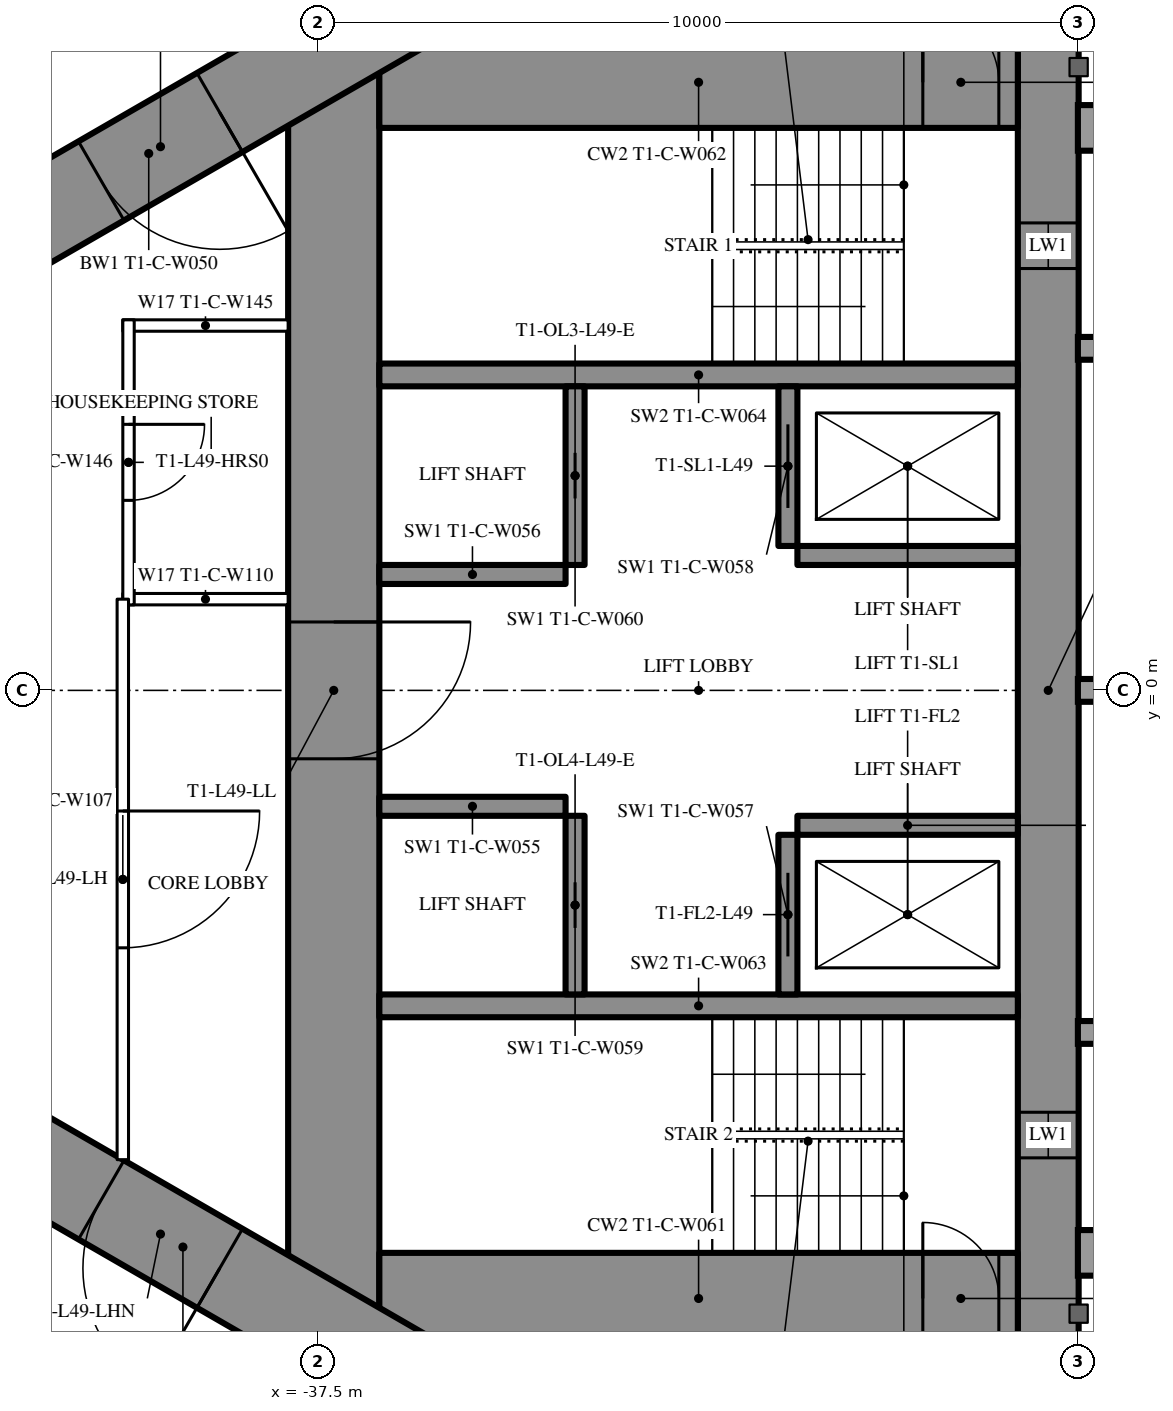
"""IFC4 building model, lengths in metres.
Left out: names, types, materials, properties, quantities, classifications, styles, units other than length and angle.
Written with IfcOpenShell. Run it as: python <this file> out.ifc"""

import sys

from ifc_helpers import new_model, si_unit, direction, frame, frame_2d, origin, place, context, subcontext, project, spatial, rectangle, extrude, element, fill, save


model = new_model("IFC4")
c1 = context("Model", 3, precision=1e-05, world=origin(), true_north=direction((0.0, 1.0)))
c2 = subcontext(c1, "Body", "Model", "MODEL_VIEW")
j1 = project(units=[si_unit("LENGTHUNIT", "METRE"), si_unit("PLANEANGLEUNIT", "RADIAN")], contexts=[c1])
p1 = place(None, origin())
s1 = spatial("IfcSite", under=j1, at=p1, CompositionType="ELEMENT")
p2 = place(p1, origin())
s2 = spatial("IfcBuilding", under=s1, at=p2, CompositionType="ELEMENT")
p3 = place(p2, frame((0.0, 0.0, 184.3)))
s3 = spatial("IfcBuildingStorey", under=s2, at=p3, CompositionType="ELEMENT", Elevation=184.3)
p4 = place(p3, frame((-27.9, 8.6, 0.0), z_axis=(0.0, 0.0, 1.0), x_axis=(0.0, -1.0, 0.0)))
e1 = element("IfcWall", 1, at=p4, inside=s3, PredefinedType="SHEAR", context=c2, shape_type="SweptSolid", body=[
    extrude(rectangle(XDim=17.2, YDim=0.8, at=frame_2d((8.6, 0.0))), origin(), (0.0, 0.0, 1.0), 3.5),
])
p5 = place(p4, frame((2.45, 0.0, 0.6)))
e2 = element("IfcOpeningElement", 2, at=p5, cuts=e1, PredefinedType="OPENING", context=c2, shape_type="SweptSolid", body=[
    extrude(rectangle(XDim=0.6, YDim=2.1, at=frame_2d((0.3, 1.05))), frame((0.0, 0.41, 0.0), z_axis=(0.0, -1.0, 0.0), x_axis=(1.0, 0.0, 0.0)), (0.0, 0.0, 1.0), 0.82),
])
p6 = place(p4, frame((14.15, 0.0, 0.6)))
e3 = element("IfcOpeningElement", 3, at=p6, cuts=e1, PredefinedType="OPENING", context=c2, shape_type="SweptSolid", body=[
    extrude(rectangle(XDim=0.6, YDim=2.1, at=frame_2d((0.3, 1.05))), frame((0.0, 0.41, 0.0), z_axis=(0.0, -1.0, 0.0), x_axis=(1.0, 0.0, 0.0)), (0.0, 0.0, 1.0), 0.82),
])
p7 = place(p3, frame((-37.3, 8.6, 0.0), z_axis=(0.0, 0.0, 1.0), x_axis=(0.0, -1.0, 0.0)))
e4 = element("IfcWall", 4, at=p7, inside=s3, PredefinedType="SHEAR", context=c2, shape_type="SweptSolid", body=[
    extrude(rectangle(XDim=17.2, YDim=1.2, at=frame_2d((8.6, 0.0))), origin(), (0.0, 0.0, 1.0), 3.5),
])
p8 = place(p7, frame((7.7, 0.0, 0.0)))
e5 = element("IfcOpeningElement", 5, at=p8, cuts=e4, PredefinedType="OPENING", context=c2, shape_type="SweptSolid", body=[
    extrude(rectangle(XDim=1.8, YDim=2.2, at=frame_2d((0.9, 1.1))), frame((0.0, 0.61, 0.0), z_axis=(0.0, -1.0, 0.0), x_axis=(1.0, 0.0, 0.0)), (0.0, 0.0, 1.0), 1.22),
])
p9 = place(p3, frame((-28.3, 8.0, 0.0), z_axis=(0.0, 0.0, 1.0), x_axis=(-1.0, 0.0, 0.0)))
e6 = element("IfcWall", 6, at=p9, inside=s3, PredefinedType="SHEAR", context=c2, shape_type="SweptSolid", body=[
    extrude(rectangle(XDim=8.4, YDim=1.2, at=frame_2d((4.2, 0.0))), origin(), (0.0, 0.0, 1.0), 3.5),
])
p10 = place(p9, frame((0.25, 0.0, 0.0)))
e7 = element("IfcOpeningElement", 7, at=p10, cuts=e6, PredefinedType="OPENING", context=c2, shape_type="SweptSolid", body=[
    extrude(rectangle(XDim=1.0, YDim=2.2, at=frame_2d((0.5, 1.1))), frame((0.0, 0.61, 0.0), z_axis=(0.0, -1.0, 0.0), x_axis=(1.0, 0.0, 0.0)), (0.0, 0.0, 1.0), 1.22),
])
p11 = place(p3, frame((-28.3, -8.0, 0.0), z_axis=(0.0, 0.0, 1.0), x_axis=(-1.0, 0.0, 0.0)))
e8 = element("IfcWall", 8, at=p11, inside=s3, PredefinedType="SHEAR", context=c2, shape_type="SweptSolid", body=[
    extrude(rectangle(XDim=8.4, YDim=1.2, at=frame_2d((4.2, 0.0))), origin(), (0.0, 0.0, 1.0), 3.5),
])
p12 = place(p11, frame((0.25, 0.0, 0.0)))
e9 = element("IfcOpeningElement", 9, at=p12, cuts=e8, PredefinedType="OPENING", context=c2, shape_type="SweptSolid", body=[
    extrude(rectangle(XDim=1.0, YDim=2.2, at=frame_2d((0.5, 1.1))), frame((0.0, 0.61, 0.0), z_axis=(0.0, -1.0, 0.0), x_axis=(1.0, 0.0, 0.0)), (0.0, 0.0, 1.0), 1.22),
])
for number, where, z_axis, x_axis in (
    (10, (-28.3, 4.15, 0.0), (0.0, 0.0, 1.0), (-1.0, 0.0, 0.0)),
    (11, (-28.3, -4.15, 0.0), (0.0, 0.0, 1.0), (-1.0, 0.0, 0.0)),
):
    element("IfcWall", number, at=place(p3, frame(where, z_axis=z_axis, x_axis=x_axis)), inside=s3, PredefinedType="SHEAR", context=c2, shape_type="SweptSolid", body=[
        extrude(rectangle(XDim=8.4, YDim=0.3, at=frame_2d((4.2, 0.0))), origin(), (0.0, 0.0, 1.0), 3.5),
    ])
p13 = place(p3, frame((-31.325, 4.0, 0.0), z_axis=(0.0, 0.0, 1.0), x_axis=(0.0, -1.0, 0.0)))
e12 = element("IfcWall", 12, at=p13, inside=s3, PredefinedType="SHEAR", context=c2, shape_type="SweptSolid", body=[
    extrude(rectangle(XDim=2.1, YDim=0.25, at=frame_2d((1.05, 0.0))), origin(), (0.0, 0.0, 1.0), 3.5),
])
p14 = place(p13, frame((0.5, 0.0, 0.0)))
e13 = element("IfcOpeningElement", 13, at=p14, cuts=e12, PredefinedType="OPENING", context=c2, shape_type="SweptSolid", body=[
    extrude(rectangle(XDim=1.1, YDim=2.2, at=frame_2d((0.55, 1.1))), frame((0.0, 0.135, 0.0), z_axis=(0.0, -1.0, 0.0), x_axis=(1.0, 0.0, 0.0)), (0.0, 0.0, 1.0), 0.27),
])
p15 = place(p3, frame((-34.125, 4.0, 0.0), z_axis=(0.0, 0.0, 1.0), x_axis=(0.0, -1.0, 0.0)))
e14 = element("IfcWall", 14, at=p15, inside=s3, PredefinedType="SHEAR", context=c2, shape_type="SweptSolid", body=[
    extrude(rectangle(XDim=2.35, YDim=0.25, at=frame_2d((1.175, 0.0))), origin(), (0.0, 0.0, 1.0), 3.5),
])
p16 = place(p15, frame((0.875, 0.0, 0.0)))
e15 = element("IfcOpeningElement", 15, at=p16, cuts=e14, PredefinedType="OPENING", context=c2, shape_type="SweptSolid", body=[
    extrude(rectangle(XDim=0.6, YDim=2.0, at=frame_2d((0.3, 1.0))), frame((0.0, 0.135, 0.0), z_axis=(0.0, -1.0, 0.0), x_axis=(1.0, 0.0, 0.0)), (0.0, 0.0, 1.0), 0.27),
])
p17 = place(p3, frame((-28.3, 1.775, 0.0), z_axis=(0.0, 0.0, 1.0), x_axis=(-1.0, 0.0, 0.0)))
e16 = element("IfcWall", 16, at=p17, inside=s3, PredefinedType="SHEAR", context=c2, shape_type="SweptSolid", body=[
    extrude(rectangle(XDim=2.9, YDim=0.25, at=frame_2d((1.45, 0.0))), origin(), (0.0, 0.0, 1.0), 3.5),
])
p18 = place(p3, frame((-34.25, 1.525, 0.0), z_axis=(0.0, 0.0, 1.0), x_axis=(-1.0, 0.0, 0.0)))
e17 = element("IfcWall", 17, at=p18, inside=s3, PredefinedType="SHEAR", context=c2, shape_type="SweptSolid", body=[
    extrude(rectangle(XDim=2.45, YDim=0.25, at=frame_2d((1.225, 0.0))), origin(), (0.0, 0.0, 1.0), 3.5),
])
p19 = place(p3, frame((-31.325, -1.9, 0.0), z_axis=(0.0, 0.0, 1.0), x_axis=(0.0, -1.0, 0.0)))
e18 = element("IfcWall", 18, at=p19, inside=s3, PredefinedType="SHEAR", context=c2, shape_type="SweptSolid", body=[
    extrude(rectangle(XDim=2.1, YDim=0.25, at=frame_2d((1.05, 0.0))), origin(), (0.0, 0.0, 1.0), 3.5),
])
p20 = place(p19, frame((0.5, 0.0, 0.0)))
e19 = element("IfcOpeningElement", 19, at=p20, cuts=e18, PredefinedType="OPENING", context=c2, shape_type="SweptSolid", body=[
    extrude(rectangle(XDim=1.1, YDim=2.2, at=frame_2d((0.55, 1.1))), frame((0.0, 0.135, 0.0), z_axis=(0.0, -1.0, 0.0), x_axis=(1.0, 0.0, 0.0)), (0.0, 0.0, 1.0), 0.27),
])
p21 = place(p3, frame((-34.125, -1.65, 0.0), z_axis=(0.0, 0.0, 1.0), x_axis=(0.0, -1.0, 0.0)))
e20 = element("IfcWall", 20, at=p21, inside=s3, PredefinedType="SHEAR", context=c2, shape_type="SweptSolid", body=[
    extrude(rectangle(XDim=2.35, YDim=0.25, at=frame_2d((1.175, 0.0))), origin(), (0.0, 0.0, 1.0), 3.5),
])
p22 = place(p21, frame((0.875, 0.0, 0.0)))
e21 = element("IfcOpeningElement", 21, at=p22, cuts=e20, PredefinedType="OPENING", context=c2, shape_type="SweptSolid", body=[
    extrude(rectangle(XDim=0.6, YDim=2.0, at=frame_2d((0.3, 1.0))), frame((0.0, 0.135, 0.0), z_axis=(0.0, -1.0, 0.0), x_axis=(1.0, 0.0, 0.0)), (0.0, 0.0, 1.0), 0.27),
])
p23 = place(p3, frame((-28.3, -1.775, 0.0), z_axis=(0.0, 0.0, 1.0), x_axis=(-1.0, 0.0, 0.0)))
e22 = element("IfcWall", 22, at=p23, inside=s3, PredefinedType="SHEAR", context=c2, shape_type="SweptSolid", body=[
    extrude(rectangle(XDim=2.9, YDim=0.25, at=frame_2d((1.45, 0.0))), origin(), (0.0, 0.0, 1.0), 3.5),
])
p24 = place(p3, frame((-34.25, -1.525, 0.0), z_axis=(0.0, 0.0, 1.0), x_axis=(-1.0, 0.0, 0.0)))
e23 = element("IfcWall", 23, at=p24, inside=s3, PredefinedType="SHEAR", context=c2, shape_type="SweptSolid", body=[
    extrude(rectangle(XDim=2.45, YDim=0.25, at=frame_2d((1.225, 0.0))), origin(), (0.0, 0.0, 1.0), 3.5),
])
p25 = place(p3, frame((-27.2, 14.3, 0.0), z_axis=(0.0, 0.0, 1.0), x_axis=(-0.866026593062, -0.499997940104, 0.0)))
e24 = element("IfcWall", 24, at=p25, inside=s3, PredefinedType="SHEAR", context=c2, shape_type="SweptSolid", body=[
    extrude(rectangle(XDim=28.946, YDim=1.2, at=frame_2d((14.473, 0.0))), origin(), (0.0, 0.0, 1.0), 3.5),
])
p26 = place(p25, frame((4.6, 0.0, 0.0)))
e25 = element("IfcOpeningElement", 25, at=p26, cuts=e24, PredefinedType="OPENING", context=c2, shape_type="SweptSolid", body=[
    extrude(rectangle(XDim=1.0, YDim=2.2, at=frame_2d((0.5, 1.1))), frame((0.0, 0.61, 0.0), z_axis=(0.0, -1.0, 0.0), x_axis=(1.0, 0.0, 0.0)), (0.0, 0.0, 1.0), 1.22),
])
p27 = place(p25, frame((13.395, 0.0, 0.0)))
e26 = element("IfcOpeningElement", 26, at=p27, cuts=e24, PredefinedType="OPENING", context=c2, shape_type="SweptSolid", body=[
    extrude(rectangle(XDim=1.8, YDim=2.2, at=frame_2d((0.9, 1.1))), frame((0.0, 0.61, 0.0), z_axis=(0.0, -1.0, 0.0), x_axis=(1.0, 0.0, 0.0)), (0.0, 0.0, 1.0), 1.22),
])
p28 = place(p3, frame((-27.2, -14.3, 0.0), z_axis=(0.0, 0.0, 1.0), x_axis=(-0.866024021859, 0.500002393557, 0.0)))
e27 = element("IfcWall", 27, at=p28, inside=s3, PredefinedType="SHEAR", context=c2, shape_type="SweptSolid", body=[
    extrude(rectangle(XDim=27.907, YDim=1.2, at=frame_2d((13.954, 0.0))), origin(), (0.0, 0.0, 1.0), 3.5),
])
p29 = place(p28, frame((4.6, 0.0, 0.0)))
e28 = element("IfcOpeningElement", 28, at=p29, cuts=e27, PredefinedType="OPENING", context=c2, shape_type="SweptSolid", body=[
    extrude(rectangle(XDim=1.0, YDim=2.2, at=frame_2d((0.5, 1.1))), frame((0.0, 0.61, 0.0), z_axis=(0.0, -1.0, 0.0), x_axis=(1.0, 0.0, 0.0)), (0.0, 0.0, 1.0), 1.22),
])
p30 = place(p28, frame((13.395, 0.0, 0.0)))
e29 = element("IfcOpeningElement", 29, at=p30, cuts=e27, PredefinedType="OPENING", context=c2, shape_type="SweptSolid", body=[
    extrude(rectangle(XDim=1.8, YDim=2.2, at=frame_2d((0.9, 1.1))), frame((0.0, 0.61, 0.0), z_axis=(0.0, -1.0, 0.0), x_axis=(1.0, 0.0, 0.0)), (0.0, 0.0, 1.0), 1.22),
])
for number, where, z_axis, x_axis in (
    (30, (-37.9, 1.2, 0.0), (0.0, 0.0, 1.0), (-1.0, 0.0, 0.0)),
    (31, (-37.9, 4.8, 0.0), (0.0, 0.0, 1.0), (-1.0, 0.0, 0.0)),
):
    element("IfcWall", number, at=place(p3, frame(where, z_axis=z_axis, x_axis=x_axis)), inside=s3, PredefinedType="PARTITIONING", context=c2, shape_type="SweptSolid", body=[
        extrude(rectangle(XDim=2.175, YDim=0.15, at=frame_2d((1.087, 0.0))), origin(), (0.0, 0.0, 1.0), 3.25),
    ])
p31 = place(p3, frame((-40.0, 4.875, 0.0), z_axis=(0.0, 0.0, 1.0), x_axis=(0.0, -1.0, 0.0)))
e32 = element("IfcWall", 32, at=p31, inside=s3, PredefinedType="PARTITIONING", context=c2, shape_type="SweptSolid", body=[
    extrude(rectangle(XDim=3.75, YDim=0.15, at=frame_2d((1.875, 0.0))), origin(), (0.0, 0.0, 1.0), 3.25),
])
p32 = place(p31, frame((1.375, 0.0, 0.0)))
e33 = element("IfcOpeningElement", 33, at=p32, cuts=e32, PredefinedType="OPENING", context=c2, shape_type="SweptSolid", body=[
    extrude(rectangle(XDim=1.0, YDim=2.2, at=frame_2d((0.5, 1.1))), frame((0.0, 0.085, 0.0), z_axis=(0.0, -1.0, 0.0), x_axis=(1.0, 0.0, 0.0)), (0.0, 0.0, 1.0), 0.17),
])
p33 = place(p3, frame((-40.075, 1.2, 0.0), z_axis=(0.0, 0.0, 1.0), x_axis=(0.0, -1.0, 0.0)))
e34 = element("IfcWall", 34, at=p33, inside=s3, PredefinedType="PARTITIONING", context=c2, shape_type="SweptSolid", body=[
    extrude(rectangle(XDim=7.374, YDim=0.15, at=frame_2d((3.687, 0.0))), origin(), (0.0, 0.0, 1.0), 3.25),
])
p34 = place(p33, frame((2.787, 0.0, 0.0)))
e35 = element("IfcOpeningElement", 35, at=p34, cuts=e34, PredefinedType="OPENING", context=c2, shape_type="SweptSolid", body=[
    extrude(rectangle(XDim=1.8, YDim=2.2, at=frame_2d((0.9, 1.1))), frame((0.0, 0.085, 0.0), z_axis=(0.0, -1.0, 0.0), x_axis=(1.0, 0.0, 0.0)), (0.0, 0.0, 1.0), 0.17),
])
p35 = place(p3, frame((-39.758, -11.697, 0.0), z_axis=(0.0, 0.0, 1.0), x_axis=(-0.866024194504, 0.500002094529, 0.0)))
e36 = element("IfcWall", 36, at=p35, inside=s3, PredefinedType="PARTITIONING", context=c2, shape_type="SweptSolid", body=[
    extrude(rectangle(XDim=6.6, YDim=0.25, at=frame_2d((3.3, 0.0))), origin(), (0.0, 0.0, 1.0), 3.25),
])
p36 = place(p35, frame((0.75, 0.0, 0.0)))
e37 = element("IfcOpeningElement", 37, at=p36, cuts=e36, PredefinedType="OPENING", context=c2, shape_type="SweptSolid", body=[
    extrude(rectangle(XDim=1.1, YDim=2.2, at=frame_2d((0.55, 1.1))), frame((0.0, 0.135, 0.0), z_axis=(0.0, -1.0, 0.0), x_axis=(1.0, 0.0, 0.0)), (0.0, 0.0, 1.0), 0.27),
])
p37 = place(p35, frame((2.75, 0.0, 0.0)))
e38 = element("IfcOpeningElement", 38, at=p37, cuts=e36, PredefinedType="OPENING", context=c2, shape_type="SweptSolid", body=[
    extrude(rectangle(XDim=1.1, YDim=2.2, at=frame_2d((0.55, 1.1))), frame((0.0, 0.135, 0.0), z_axis=(0.0, -1.0, 0.0), x_axis=(1.0, 0.0, 0.0)), (0.0, 0.0, 1.0), 0.27),
])
p38 = place(p35, frame((4.75, 0.0, 0.0)))
e39 = element("IfcOpeningElement", 39, at=p38, cuts=e36, PredefinedType="OPENING", context=c2, shape_type="SweptSolid", body=[
    extrude(rectangle(XDim=1.1, YDim=2.2, at=frame_2d((0.55, 1.1))), frame((0.0, 0.135, 0.0), z_axis=(0.0, -1.0, 0.0), x_axis=(1.0, 0.0, 0.0)), (0.0, 0.0, 1.0), 0.27),
])
p39 = place(p32, origin())
e40 = element("IfcDoor", 40, at=p39, inside=s3, OperationType="SINGLE_SWING_LEFT", PredefinedType="DOOR", context=c2, shape_type="SweptSolid", body=[
    extrude(rectangle(XDim=1.0, YDim=2.2, at=frame_2d((0.5, 1.1))), frame((0.0, 0.025, 0.0), z_axis=(0.0, -1.0, 0.0), x_axis=(1.0, 0.0, 0.0)), (0.0, 0.0, 1.0), 0.05),
])
fill(e33, e40)
p40 = place(p34, origin())
e41 = element("IfcDoor", 41, at=p40, inside=s3, OperationType="DOUBLE_DOOR_SINGLE_SWING", PredefinedType="DOOR", context=c2, shape_type="SweptSolid", body=[
    extrude(rectangle(XDim=1.8, YDim=2.2, at=frame_2d((0.9, 1.1))), frame((0.0, 0.025, 0.0), z_axis=(0.0, -1.0, 0.0), x_axis=(1.0, 0.0, 0.0)), (0.0, 0.0, 1.0), 0.05),
])
fill(e35, e41)
p41 = place(p27, origin())
e42 = element("IfcDoor", 42, at=p41, inside=s3, OperationType="DOUBLE_DOOR_SINGLE_SWING", PredefinedType="DOOR", context=c2, shape_type="SweptSolid", body=[
    extrude(rectangle(XDim=1.8, YDim=2.2, at=frame_2d((0.9, 1.1))), frame((0.0, 0.025, 0.0), z_axis=(0.0, -1.0, 0.0), x_axis=(1.0, 0.0, 0.0)), (0.0, 0.0, 1.0), 0.05),
])
fill(e26, e42)
p42 = place(p30, origin())
e43 = element("IfcDoor", 43, at=p42, inside=s3, OperationType="DOUBLE_DOOR_SINGLE_SWING", PredefinedType="DOOR", context=c2, shape_type="SweptSolid", body=[
    extrude(rectangle(XDim=1.8, YDim=2.2, at=frame_2d((0.9, 1.1))), frame((0.0, 0.025, 0.0), z_axis=(0.0, -1.0, 0.0), x_axis=(1.0, 0.0, 0.0)), (0.0, 0.0, 1.0), 0.05),
])
fill(e29, e43)
p43 = place(p8, origin())
e44 = element("IfcDoor", 44, at=p43, inside=s3, OperationType="DOUBLE_DOOR_SINGLE_SWING", PredefinedType="DOOR", context=c2, shape_type="SweptSolid", body=[
    extrude(rectangle(XDim=1.8, YDim=2.2, at=frame_2d((0.9, 1.1))), frame((0.0, 0.025, 0.0), z_axis=(0.0, -1.0, 0.0), x_axis=(1.0, 0.0, 0.0)), (0.0, 0.0, 1.0), 0.05),
])
fill(e5, e44)
p44 = place(p10, origin())
e45 = element("IfcDoor", 45, at=p44, inside=s3, OperationType="SINGLE_SWING_RIGHT", PredefinedType="DOOR", context=c2, shape_type="SweptSolid", body=[
    extrude(rectangle(XDim=1.0, YDim=2.2, at=frame_2d((0.5, 1.1))), frame((0.0, 0.025, 0.0), z_axis=(0.0, -1.0, 0.0), x_axis=(1.0, 0.0, 0.0)), (0.0, 0.0, 1.0), 0.05),
])
fill(e7, e45)
p45 = place(p12, origin())
e46 = element("IfcDoor", 46, at=p45, inside=s3, OperationType="SINGLE_SWING_RIGHT", PredefinedType="DOOR", context=c2, shape_type="SweptSolid", body=[
    extrude(rectangle(XDim=1.0, YDim=2.2, at=frame_2d((0.5, 1.1))), frame((0.0, 0.025, 0.0), z_axis=(0.0, -1.0, 0.0), x_axis=(1.0, 0.0, 0.0)), (0.0, 0.0, 1.0), 0.05),
])
fill(e9, e46)
p46 = place(p14, origin())
e47 = element("IfcDoor", 47, at=p46, inside=s3, OperationType="SLIDING_TO_LEFT", PredefinedType="USERDEFINED", context=c2, shape_type="SweptSolid", body=[
    extrude(rectangle(XDim=1.1, YDim=2.2, at=frame_2d((0.55, 1.1))), frame((0.0, 0.025, 0.0), z_axis=(0.0, -1.0, 0.0), x_axis=(1.0, 0.0, 0.0)), (0.0, 0.0, 1.0), 0.05),
])
fill(e13, e47)
p47 = place(p20, origin())
e48 = element("IfcDoor", 48, at=p47, inside=s3, OperationType="SLIDING_TO_LEFT", PredefinedType="USERDEFINED", context=c2, shape_type="SweptSolid", body=[
    extrude(rectangle(XDim=1.1, YDim=2.2, at=frame_2d((0.55, 1.1))), frame((0.0, 0.025, 0.0), z_axis=(0.0, -1.0, 0.0), x_axis=(1.0, 0.0, 0.0)), (0.0, 0.0, 1.0), 0.05),
])
fill(e19, e48)
p48 = place(p16, origin())
e49 = element("IfcDoor", 49, at=p48, inside=s3, OperationType="SLIDING_TO_LEFT", PredefinedType="DOOR", context=c2, shape_type="SweptSolid", body=[
    extrude(rectangle(XDim=0.6, YDim=2.0, at=frame_2d((0.3, 1.0))), frame((0.0, 0.025, 0.0), z_axis=(0.0, -1.0, 0.0), x_axis=(1.0, 0.0, 0.0)), (0.0, 0.0, 1.0), 0.05),
])
fill(e15, e49)
p49 = place(p22, origin())
e50 = element("IfcDoor", 50, at=p49, inside=s3, OperationType="SLIDING_TO_LEFT", PredefinedType="DOOR", context=c2, shape_type="SweptSolid", body=[
    extrude(rectangle(XDim=0.6, YDim=2.0, at=frame_2d((0.3, 1.0))), frame((0.0, 0.025, 0.0), z_axis=(0.0, -1.0, 0.0), x_axis=(1.0, 0.0, 0.0)), (0.0, 0.0, 1.0), 0.05),
])
fill(e21, e50)
p50 = place(p5, origin())
e51 = element("IfcWindow", 51, at=p50, inside=s3, PartitioningType="SINGLE_PANEL", PredefinedType="WINDOW", context=c2, shape_type="SweptSolid", body=[
    extrude(rectangle(XDim=0.6, YDim=2.1, at=frame_2d((0.3, 1.05))), frame((0.0, 0.03, 0.0), z_axis=(0.0, -1.0, 0.0), x_axis=(1.0, 0.0, 0.0)), (0.0, 0.0, 1.0), 0.06),
])
fill(e2, e51)
p51 = place(p6, origin())
e52 = element("IfcWindow", 52, at=p51, inside=s3, PartitioningType="SINGLE_PANEL", PredefinedType="WINDOW", context=c2, shape_type="SweptSolid", body=[
    extrude(rectangle(XDim=0.6, YDim=2.1, at=frame_2d((0.3, 1.05))), frame((0.0, 0.03, 0.0), z_axis=(0.0, -1.0, 0.0), x_axis=(1.0, 0.0, 0.0)), (0.0, 0.0, 1.0), 0.06),
])
fill(e3, e52)
save(model, sys.argv[1])
